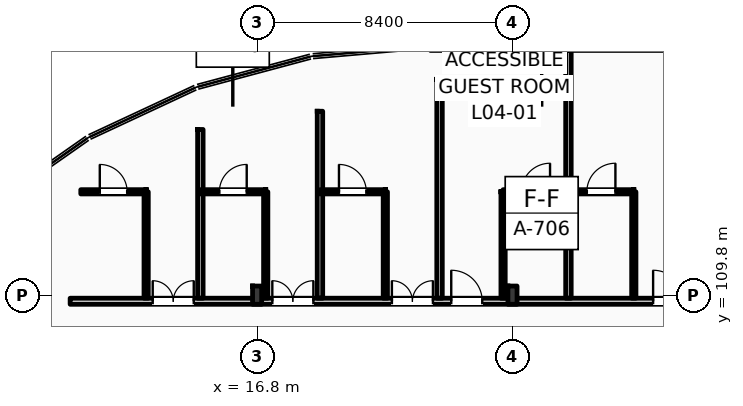
"""IFC4 building model, lengths in metres.
Left out: names, types, materials, properties, quantities, classifications, styles, units other than length and angle.
Written with IfcOpenShell. Run it as: python <this file> out.ifc"""

import sys

from ifc_helpers import new_model, si_unit, direction, frame, frame_2d, origin, origin_2d, place, context, subcontext, project, spatial, rectangle, i_section, extrude, element, fill, save


model = new_model("IFC4")
c1 = context("Model", 3, precision=1e-05, world=origin(), true_north=direction((0.0, 1.0)))
c2 = subcontext(c1, "Body", "Model", "MODEL_VIEW")
j1 = project(units=[si_unit("LENGTHUNIT", "METRE"), si_unit("PLANEANGLEUNIT", "RADIAN")], contexts=[c1])
p1 = place(None, origin())
s1 = spatial("IfcSite", under=j1, at=p1, CompositionType="ELEMENT")
p2 = place(p1, origin())
s2 = spatial("IfcBuilding", under=s1, at=p2, CompositionType="ELEMENT")
p3 = place(p2, frame((0.0, 0.0, 20.4)))
s3 = spatial("IfcBuildingStorey", under=s2, at=p3, CompositionType="ELEMENT", Elevation=20.4)
for number, where, z_axis, x_axis in (
    (1, (16.8, 109.8, 0.0), (0.0, 0.0, 1.0), (1.0, 0.0, 0.0)),
    (2, (25.2, 109.8, 0.0), (0.0, 0.0, 1.0), (1.0, 0.0, 0.0)),
):
    element("IfcColumn", number, at=place(p3, frame(where, z_axis=z_axis, x_axis=x_axis)), inside=s3, PredefinedType="COLUMN", context=c2, shape_type="SweptSolid", body=[
        extrude(i_section(OverallWidth=0.3, OverallDepth=0.6, WebThickness=0.015, FlangeThickness=0.03, FilletRadius=0.027, at=origin_2d()), origin(), (0.0, 0.0, 1.0), 4.2),
    ])
p4 = place(p3, frame((25.2, 118.0, 0.0), z_axis=(0.0, 0.0, 1.0), x_axis=(1.0, 0.0, 0.0)))
e3 = element("IfcColumn", 3, at=p4, inside=s3, PredefinedType="COLUMN", context=c2, shape_type="SweptSolid", body=[
    extrude(i_section(OverallWidth=0.3, OverallDepth=0.55, WebThickness=0.015, FlangeThickness=0.029, FilletRadius=0.027, at=origin_2d()), origin(), (0.0, 0.0, 1.0), 4.2),
])
p5 = place(p3, frame((10.65, 109.6, 0.0), z_axis=(0.0, 0.0, 1.0), x_axis=(1.0, 0.0, 0.0)))
e4 = element("IfcWall", 4, at=p5, inside=s3, PredefinedType="PARTITIONING", context=c2, shape_type="SweptSolid", body=[
    extrude(rectangle(XDim=109.21, YDim=0.2, at=frame_2d((54.605, 0.0))), origin(), (0.0, 0.0, 1.0), 3.38),
])
p6 = place(p5, frame((12.535, 0.0, 0.0)))
e5 = element("IfcOpeningElement", 5, at=p6, cuts=e4, PredefinedType="OPENING", context=c2, shape_type="SweptSolid", body=[
    extrude(rectangle(XDim=1.02, YDim=2.2, at=frame_2d((0.51, 1.1))), frame((0.0, 0.11, 0.0), z_axis=(0.0, -1.0, 0.0), x_axis=(1.0, 0.0, 0.0)), (0.0, 0.0, 1.0), 0.22),
])
p7 = place(p5, frame((19.175, 0.0, 0.0)))
e6 = element("IfcOpeningElement", 6, at=p7, cuts=e4, PredefinedType="OPENING", context=c2, shape_type="SweptSolid", body=[
    extrude(rectangle(XDim=1.02, YDim=2.2, at=frame_2d((0.51, 1.1))), frame((0.0, 0.11, 0.0), z_axis=(0.0, -1.0, 0.0), x_axis=(1.0, 0.0, 0.0)), (0.0, 0.0, 1.0), 0.22),
])
p8 = place(p5, frame((23.375, 0.0, 0.0)))
e7 = element("IfcOpeningElement", 7, at=p8, cuts=e4, PredefinedType="OPENING", context=c2, shape_type="SweptSolid", body=[
    extrude(rectangle(XDim=1.02, YDim=2.2, at=frame_2d((0.51, 1.1))), frame((0.0, 0.11, 0.0), z_axis=(0.0, -1.0, 0.0), x_axis=(1.0, 0.0, 0.0)), (0.0, 0.0, 1.0), 0.22),
])
p9 = place(p5, frame((27.575, 0.0, 0.0)))
e8 = element("IfcOpeningElement", 8, at=p9, cuts=e4, PredefinedType="OPENING", context=c2, shape_type="SweptSolid", body=[
    extrude(rectangle(XDim=1.02, YDim=2.2, at=frame_2d((0.51, 1.1))), frame((0.0, 0.11, 0.0), z_axis=(0.0, -1.0, 0.0), x_axis=(1.0, 0.0, 0.0)), (0.0, 0.0, 1.0), 0.22),
])
p10 = place(p5, frame((31.805, 0.0, 0.0)))
e9 = element("IfcOpeningElement", 9, at=p10, cuts=e4, PredefinedType="OPENING", context=c2, shape_type="SweptSolid", body=[
    extrude(rectangle(XDim=0.96, YDim=2.2, at=frame_2d((0.48, 1.1))), frame((0.0, 0.11, 0.0), z_axis=(0.0, -1.0, 0.0), x_axis=(1.0, 0.0, 0.0)), (0.0, 0.0, 1.0), 0.22),
])
p11 = place(p5, frame((33.855, 0.0, 0.0)))
e10 = element("IfcOpeningElement", 10, at=p11, cuts=e4, PredefinedType="OPENING", context=c2, shape_type="SweptSolid", body=[
    extrude(rectangle(XDim=0.96, YDim=2.2, at=frame_2d((0.48, 1.1))), frame((0.0, 0.11, 0.0), z_axis=(0.0, -1.0, 0.0), x_axis=(1.0, 0.0, 0.0)), (0.0, 0.0, 1.0), 0.22),
])
p12 = place(p5, frame((40.205, 0.0, 0.0)))
e11 = element("IfcOpeningElement", 11, at=p12, cuts=e4, PredefinedType="OPENING", context=c2, shape_type="SweptSolid", body=[
    extrude(rectangle(XDim=0.96, YDim=2.2, at=frame_2d((0.48, 1.1))), frame((0.0, 0.11, 0.0), z_axis=(0.0, -1.0, 0.0), x_axis=(1.0, 0.0, 0.0)), (0.0, 0.0, 1.0), 0.22),
])
p13 = place(p5, frame((42.255, 0.0, 0.0)))
e12 = element("IfcOpeningElement", 12, at=p13, cuts=e4, PredefinedType="OPENING", context=c2, shape_type="SweptSolid", body=[
    extrude(rectangle(XDim=0.96, YDim=2.2, at=frame_2d((0.48, 1.1))), frame((0.0, 0.11, 0.0), z_axis=(0.0, -1.0, 0.0), x_axis=(1.0, 0.0, 0.0)), (0.0, 0.0, 1.0), 0.22),
])
p14 = place(p5, frame((48.605, 0.0, 0.0)))
e13 = element("IfcOpeningElement", 13, at=p14, cuts=e4, PredefinedType="OPENING", context=c2, shape_type="SweptSolid", body=[
    extrude(rectangle(XDim=0.96, YDim=2.2, at=frame_2d((0.48, 1.1))), frame((0.0, 0.11, 0.0), z_axis=(0.0, -1.0, 0.0), x_axis=(1.0, 0.0, 0.0)), (0.0, 0.0, 1.0), 0.22),
])
p15 = place(p5, frame((50.655, 0.0, 0.0)))
e14 = element("IfcOpeningElement", 14, at=p15, cuts=e4, PredefinedType="OPENING", context=c2, shape_type="SweptSolid", body=[
    extrude(rectangle(XDim=0.96, YDim=2.2, at=frame_2d((0.48, 1.1))), frame((0.0, 0.11, 0.0), z_axis=(0.0, -1.0, 0.0), x_axis=(1.0, 0.0, 0.0)), (0.0, 0.0, 1.0), 0.22),
])
p16 = place(p5, frame((57.005, 0.0, 0.0)))
e15 = element("IfcOpeningElement", 15, at=p16, cuts=e4, PredefinedType="OPENING", context=c2, shape_type="SweptSolid", body=[
    extrude(rectangle(XDim=0.96, YDim=2.2, at=frame_2d((0.48, 1.1))), frame((0.0, 0.11, 0.0), z_axis=(0.0, -1.0, 0.0), x_axis=(1.0, 0.0, 0.0)), (0.0, 0.0, 1.0), 0.22),
])
p17 = place(p5, frame((59.055, 0.0, 0.0)))
e16 = element("IfcOpeningElement", 16, at=p17, cuts=e4, PredefinedType="OPENING", context=c2, shape_type="SweptSolid", body=[
    extrude(rectangle(XDim=0.96, YDim=2.2, at=frame_2d((0.48, 1.1))), frame((0.0, 0.11, 0.0), z_axis=(0.0, -1.0, 0.0), x_axis=(1.0, 0.0, 0.0)), (0.0, 0.0, 1.0), 0.22),
])
p18 = place(p5, frame((65.405, 0.0, 0.0)))
e17 = element("IfcOpeningElement", 17, at=p18, cuts=e4, PredefinedType="OPENING", context=c2, shape_type="SweptSolid", body=[
    extrude(rectangle(XDim=0.96, YDim=2.2, at=frame_2d((0.48, 1.1))), frame((0.0, 0.11, 0.0), z_axis=(0.0, -1.0, 0.0), x_axis=(1.0, 0.0, 0.0)), (0.0, 0.0, 1.0), 0.22),
])
p19 = place(p5, frame((67.205, 0.0, 0.0)))
e18 = element("IfcOpeningElement", 18, at=p19, cuts=e4, PredefinedType="OPENING", context=c2, shape_type="SweptSolid", body=[
    extrude(rectangle(XDim=0.96, YDim=2.2, at=frame_2d((0.48, 1.1))), frame((0.0, 0.11, 0.0), z_axis=(0.0, -1.0, 0.0), x_axis=(1.0, 0.0, 0.0)), (0.0, 0.0, 1.0), 0.22),
])
p20 = place(p5, frame((73.805, 0.0, 0.0)))
e19 = element("IfcOpeningElement", 19, at=p20, cuts=e4, PredefinedType="OPENING", context=c2, shape_type="SweptSolid", body=[
    extrude(rectangle(XDim=0.96, YDim=2.2, at=frame_2d((0.48, 1.1))), frame((0.0, 0.11, 0.0), z_axis=(0.0, -1.0, 0.0), x_axis=(1.0, 0.0, 0.0)), (0.0, 0.0, 1.0), 0.22),
])
p21 = place(p5, frame((78.255, 0.0, 0.0)))
e20 = element("IfcOpeningElement", 20, at=p21, cuts=e4, PredefinedType="OPENING", context=c2, shape_type="SweptSolid", body=[
    extrude(rectangle(XDim=0.96, YDim=2.2, at=frame_2d((0.48, 1.1))), frame((0.0, 0.11, 0.0), z_axis=(0.0, -1.0, 0.0), x_axis=(1.0, 0.0, 0.0)), (0.0, 0.0, 1.0), 0.22),
])
p22 = place(p5, frame((82.205, 0.0, 0.0)))
e21 = element("IfcOpeningElement", 21, at=p22, cuts=e4, PredefinedType="OPENING", context=c2, shape_type="SweptSolid", body=[
    extrude(rectangle(XDim=0.96, YDim=2.2, at=frame_2d((0.48, 1.1))), frame((0.0, 0.11, 0.0), z_axis=(0.0, -1.0, 0.0), x_axis=(1.0, 0.0, 0.0)), (0.0, 0.0, 1.0), 0.22),
])
p23 = place(p5, frame((86.405, 0.0, 0.0)))
e22 = element("IfcOpeningElement", 22, at=p23, cuts=e4, PredefinedType="OPENING", context=c2, shape_type="SweptSolid", body=[
    extrude(rectangle(XDim=0.96, YDim=2.2, at=frame_2d((0.48, 1.1))), frame((0.0, 0.11, 0.0), z_axis=(0.0, -1.0, 0.0), x_axis=(1.0, 0.0, 0.0)), (0.0, 0.0, 1.0), 0.22),
])
p24 = place(p5, frame((90.605, 0.0, 0.0)))
e23 = element("IfcOpeningElement", 23, at=p24, cuts=e4, PredefinedType="OPENING", context=c2, shape_type="SweptSolid", body=[
    extrude(rectangle(XDim=0.96, YDim=2.2, at=frame_2d((0.48, 1.1))), frame((0.0, 0.11, 0.0), z_axis=(0.0, -1.0, 0.0), x_axis=(1.0, 0.0, 0.0)), (0.0, 0.0, 1.0), 0.22),
])
p25 = place(p5, frame((94.805, 0.0, 0.0)))
e24 = element("IfcOpeningElement", 24, at=p25, cuts=e4, PredefinedType="OPENING", context=c2, shape_type="SweptSolid", body=[
    extrude(rectangle(XDim=0.96, YDim=2.2, at=frame_2d((0.48, 1.1))), frame((0.0, 0.11, 0.0), z_axis=(0.0, -1.0, 0.0), x_axis=(1.0, 0.0, 0.0)), (0.0, 0.0, 1.0), 0.22),
])
p26 = place(p5, frame((99.005, 0.0, 0.0)))
e25 = element("IfcOpeningElement", 25, at=p26, cuts=e4, PredefinedType="OPENING", context=c2, shape_type="SweptSolid", body=[
    extrude(rectangle(XDim=0.96, YDim=2.2, at=frame_2d((0.48, 1.1))), frame((0.0, 0.11, 0.0), z_axis=(0.0, -1.0, 0.0), x_axis=(1.0, 0.0, 0.0)), (0.0, 0.0, 1.0), 0.22),
])
p27 = place(p5, frame((103.205, 0.0, 0.0)))
e26 = element("IfcOpeningElement", 26, at=p27, cuts=e4, PredefinedType="OPENING", context=c2, shape_type="SweptSolid", body=[
    extrude(rectangle(XDim=0.96, YDim=2.2, at=frame_2d((0.48, 1.1))), frame((0.0, 0.11, 0.0), z_axis=(0.0, -1.0, 0.0), x_axis=(1.0, 0.0, 0.0)), (0.0, 0.0, 1.0), 0.22),
])
p28 = place(p5, frame((105.335, 0.0, 0.0)))
e27 = element("IfcOpeningElement", 27, at=p28, cuts=e4, PredefinedType="OPENING", context=c2, shape_type="SweptSolid", body=[
    extrude(rectangle(XDim=0.96, YDim=2.2, at=frame_2d((0.48, 1.1))), frame((0.0, 0.11, 0.0), z_axis=(0.0, -1.0, 0.0), x_axis=(1.0, 0.0, 0.0)), (0.0, 0.0, 1.0), 0.22),
])
p29 = place(p5, frame((2.716, 0.0, 0.0)))
e28 = element("IfcOpeningElement", 28, at=p29, cuts=e4, PredefinedType="OPENING", context=c2, shape_type="SweptSolid", body=[
    extrude(rectangle(XDim=1.35, YDim=2.25, at=frame_2d((0.675, 1.125))), frame((0.0, 0.11, 0.0), z_axis=(0.0, -1.0, 0.0), x_axis=(1.0, 0.0, 0.0)), (0.0, 0.0, 1.0), 0.22),
])
p30 = place(p5, frame((6.65, 0.0, 0.0)))
e29 = element("IfcOpeningElement", 29, at=p30, cuts=e4, PredefinedType="OPENING", context=c2, shape_type="SweptSolid", body=[
    extrude(rectangle(XDim=1.35, YDim=2.25, at=frame_2d((0.675, 1.125))), frame((0.0, 0.11, 0.0), z_axis=(0.0, -1.0, 0.0), x_axis=(1.0, 0.0, 0.0)), (0.0, 0.0, 1.0), 0.22),
])
p31 = place(p5, frame((10.583, 0.0, 0.0)))
e30 = element("IfcOpeningElement", 30, at=p31, cuts=e4, PredefinedType="OPENING", context=c2, shape_type="SweptSolid", body=[
    extrude(rectangle(XDim=1.35, YDim=2.25, at=frame_2d((0.675, 1.125))), frame((0.0, 0.11, 0.0), z_axis=(0.0, -1.0, 0.0), x_axis=(1.0, 0.0, 0.0)), (0.0, 0.0, 1.0), 0.22),
])
p32 = place(p3, frame((27.04, 109.7, 0.0), z_axis=(0.0, 0.0, 1.0), x_axis=(0.0, 1.0, 0.0)))
e31 = element("IfcWall", 31, at=p32, inside=s3, PredefinedType="PARTITIONING", context=c2, shape_type="SweptSolid", body=[
    extrude(rectangle(XDim=8.15, YDim=0.18, at=frame_2d((4.075, 0.0))), origin(), (0.0, 0.0, 1.0), 3.94),
])
p33 = place(p3, frame((24.89, 109.7, 0.0), z_axis=(0.0, 0.0, 1.0), x_axis=(0.0, 1.0, 0.0)))
e32 = element("IfcWall", 32, at=p33, inside=s3, PredefinedType="PARTITIONING", context=c2, shape_type="SweptSolid", body=[
    extrude(rectangle(XDim=3.5, YDim=0.14, at=frame_2d((1.75, 0.0))), origin(), (0.0, 0.0, 1.0), 3.94),
])
p34 = place(p3, frame((24.89, 113.2, 0.0), z_axis=(0.0, 0.0, 1.0), x_axis=(1.0, 0.0, 0.0)))
e33 = element("IfcWall", 33, at=p34, inside=s3, PredefinedType="PARTITIONING", context=c2, shape_type="SweptSolid", body=[
    extrude(rectangle(XDim=2.15, YDim=0.14, at=frame_2d((1.075, 0.0))), origin(), (0.0, 0.0, 1.0), 3.94),
])
p35 = place(p34, frame((0.605, 0.0, 0.0)))
e34 = element("IfcOpeningElement", 34, at=p35, cuts=e33, PredefinedType="OPENING", context=c2, shape_type="SweptSolid", body=[
    extrude(rectangle(XDim=0.94, YDim=2.15, at=frame_2d((0.47, 1.075))), frame((0.0, 0.08, 0.0), z_axis=(0.0, -1.0, 0.0), x_axis=(1.0, 0.0, 0.0)), (0.0, 0.0, 1.0), 0.16),
])
p36 = place(p3, frame((29.19, 109.7, 0.0), z_axis=(0.0, 0.0, 1.0), x_axis=(0.0, 1.0, 0.0)))
e35 = element("IfcWall", 35, at=p36, inside=s3, PredefinedType="PARTITIONING", context=c2, shape_type="SweptSolid", body=[
    extrude(rectangle(XDim=3.5, YDim=0.14, at=frame_2d((1.75, 0.0))), origin(), (0.0, 0.0, 1.0), 3.94),
])
p37 = place(p3, frame((27.04, 113.2, 0.0), z_axis=(0.0, 0.0, 1.0), x_axis=(1.0, 0.0, 0.0)))
e36 = element("IfcWall", 36, at=p37, inside=s3, PredefinedType="PARTITIONING", context=c2, shape_type="SweptSolid", body=[
    extrude(rectangle(XDim=2.15, YDim=0.14, at=frame_2d((1.075, 0.0))), origin(), (0.0, 0.0, 1.0), 3.94),
])
p38 = place(p37, frame((0.605, 0.0, 0.0)))
e37 = element("IfcOpeningElement", 37, at=p38, cuts=e36, PredefinedType="OPENING", context=c2, shape_type="SweptSolid", body=[
    extrude(rectangle(XDim=0.94, YDim=2.15, at=frame_2d((0.47, 1.075))), frame((0.0, 0.08, 0.0), z_axis=(0.0, -1.0, 0.0), x_axis=(1.0, 0.0, 0.0)), (0.0, 0.0, 1.0), 0.16),
])
p39 = place(p3, frame((14.933, 109.7, 0.0), z_axis=(0.0, 0.0, 1.0), x_axis=(0.0, 1.0, 0.0)))
e38 = element("IfcWall", 38, at=p39, inside=s3, PredefinedType="PARTITIONING", context=c2, shape_type="SweptSolid", body=[
    extrude(rectangle(XDim=5.55, YDim=0.18, at=frame_2d((2.775, 0.0))), origin(), (0.0, 0.0, 1.0), 3.94),
])
p40 = place(p3, frame((13.15, 109.7, 0.0), z_axis=(0.0, 0.0, 1.0), x_axis=(0.0, 1.0, 0.0)))
e39 = element("IfcWall", 39, at=p40, inside=s3, PredefinedType="PARTITIONING", context=c2, shape_type="SweptSolid", body=[
    extrude(rectangle(XDim=3.5, YDim=0.14, at=frame_2d((1.75, 0.0))), origin(), (0.0, 0.0, 1.0), 3.94),
])
p41 = place(p3, frame((11.0, 113.2, 0.0), z_axis=(0.0, 0.0, 1.0), x_axis=(1.0, 0.0, 0.0)))
e40 = element("IfcWall", 40, at=p41, inside=s3, PredefinedType="PARTITIONING", context=c2, shape_type="SweptSolid", body=[
    extrude(rectangle(XDim=2.15, YDim=0.14, at=frame_2d((1.075, 0.0))), origin(), (0.0, 0.0, 1.0), 3.94),
])
p42 = place(p41, frame((0.625, 0.0, 0.0)))
e41 = element("IfcOpeningElement", 41, at=p42, cuts=e40, PredefinedType="OPENING", context=c2, shape_type="SweptSolid", body=[
    extrude(rectangle(XDim=0.9, YDim=2.1, at=frame_2d((0.45, 1.05))), frame((0.0, 0.08, 0.0), z_axis=(0.0, -1.0, 0.0), x_axis=(1.0, 0.0, 0.0)), (0.0, 0.0, 1.0), 0.16),
])
p43 = place(p3, frame((18.867, 109.7, 0.0), z_axis=(0.0, 0.0, 1.0), x_axis=(0.0, 1.0, 0.0)))
e42 = element("IfcWall", 42, at=p43, inside=s3, PredefinedType="PARTITIONING", context=c2, shape_type="SweptSolid", body=[
    extrude(rectangle(XDim=6.15, YDim=0.18, at=frame_2d((3.075, 0.0))), origin(), (0.0, 0.0, 1.0), 3.94),
])
p44 = place(p3, frame((17.083, 109.7, 0.0), z_axis=(0.0, 0.0, 1.0), x_axis=(0.0, 1.0, 0.0)))
e43 = element("IfcWall", 43, at=p44, inside=s3, PredefinedType="PARTITIONING", context=c2, shape_type="SweptSolid", body=[
    extrude(rectangle(XDim=3.5, YDim=0.14, at=frame_2d((1.75, 0.0))), origin(), (0.0, 0.0, 1.0), 3.94),
])
p45 = place(p3, frame((14.933, 113.2, 0.0), z_axis=(0.0, 0.0, 1.0), x_axis=(1.0, 0.0, 0.0)))
e44 = element("IfcWall", 44, at=p45, inside=s3, PredefinedType="PARTITIONING", context=c2, shape_type="SweptSolid", body=[
    extrude(rectangle(XDim=2.15, YDim=0.14, at=frame_2d((1.075, 0.0))), origin(), (0.0, 0.0, 1.0), 3.94),
])
p46 = place(p45, frame((0.625, 0.0, 0.0)))
e45 = element("IfcOpeningElement", 45, at=p46, cuts=e44, PredefinedType="OPENING", context=c2, shape_type="SweptSolid", body=[
    extrude(rectangle(XDim=0.9, YDim=2.1, at=frame_2d((0.45, 1.05))), frame((0.0, 0.08, 0.0), z_axis=(0.0, -1.0, 0.0), x_axis=(1.0, 0.0, 0.0)), (0.0, 0.0, 1.0), 0.16),
])
p47 = place(p3, frame((22.8, 109.7, 0.0), z_axis=(0.0, 0.0, 1.0), x_axis=(0.0, 1.0, 0.0)))
e46 = element("IfcWall", 46, at=p47, inside=s3, PredefinedType="PARTITIONING", context=c2, shape_type="SweptSolid", body=[
    extrude(rectangle(XDim=7.2, YDim=0.18, at=frame_2d((3.6, 0.0))), origin(), (0.0, 0.0, 1.0), 3.94),
])
p48 = place(p3, frame((21.017, 109.7, 0.0), z_axis=(0.0, 0.0, 1.0), x_axis=(0.0, 1.0, 0.0)))
e47 = element("IfcWall", 47, at=p48, inside=s3, PredefinedType="PARTITIONING", context=c2, shape_type="SweptSolid", body=[
    extrude(rectangle(XDim=3.5, YDim=0.14, at=frame_2d((1.75, 0.0))), origin(), (0.0, 0.0, 1.0), 3.94),
])
p49 = place(p3, frame((18.867, 113.2, 0.0), z_axis=(0.0, 0.0, 1.0), x_axis=(1.0, 0.0, 0.0)))
e48 = element("IfcWall", 48, at=p49, inside=s3, PredefinedType="PARTITIONING", context=c2, shape_type="SweptSolid", body=[
    extrude(rectangle(XDim=2.15, YDim=0.14, at=frame_2d((1.075, 0.0))), origin(), (0.0, 0.0, 1.0), 3.94),
])
p50 = place(p49, frame((0.625, 0.0, 0.0)))
e49 = element("IfcOpeningElement", 49, at=p50, cuts=e48, PredefinedType="OPENING", context=c2, shape_type="SweptSolid", body=[
    extrude(rectangle(XDim=0.9, YDim=2.1, at=frame_2d((0.45, 1.05))), frame((0.0, 0.08, 0.0), z_axis=(0.0, -1.0, 0.0), x_axis=(1.0, 0.0, 0.0)), (0.0, 0.0, 1.0), 0.16),
])
p51 = place(p6, origin())
e50 = element("IfcDoor", 50, at=p51, inside=s3, OperationType="SINGLE_SWING_LEFT", PredefinedType="DOOR", context=c2, shape_type="SweptSolid", body=[
    extrude(rectangle(XDim=1.02, YDim=2.2, at=frame_2d((0.51, 1.1))), frame((0.0, 0.025, 0.0), z_axis=(0.0, -1.0, 0.0), x_axis=(1.0, 0.0, 0.0)), (0.0, 0.0, 1.0), 0.05),
])
fill(e5, e50)
p52 = place(p35, origin())
e51 = element("IfcDoor", 51, at=p52, inside=s3, OperationType="SINGLE_SWING_RIGHT", PredefinedType="DOOR", context=c2, shape_type="SweptSolid", body=[
    extrude(rectangle(XDim=0.94, YDim=2.15, at=frame_2d((0.47, 1.075))), frame((0.0, 0.025, 0.0), z_axis=(0.0, -1.0, 0.0), x_axis=(1.0, 0.0, 0.0)), (0.0, 0.0, 1.0), 0.05),
])
fill(e34, e51)
p53 = place(p7, origin())
e52 = element("IfcDoor", 52, at=p53, inside=s3, OperationType="SINGLE_SWING_LEFT", PredefinedType="DOOR", context=c2, shape_type="SweptSolid", body=[
    extrude(rectangle(XDim=1.02, YDim=2.2, at=frame_2d((0.51, 1.1))), frame((0.0, 0.025, 0.0), z_axis=(0.0, -1.0, 0.0), x_axis=(1.0, 0.0, 0.0)), (0.0, 0.0, 1.0), 0.05),
])
fill(e6, e52)
p54 = place(p38, origin())
e53 = element("IfcDoor", 53, at=p54, inside=s3, OperationType="SINGLE_SWING_RIGHT", PredefinedType="DOOR", context=c2, shape_type="SweptSolid", body=[
    extrude(rectangle(XDim=0.94, YDim=2.15, at=frame_2d((0.47, 1.075))), frame((0.0, 0.025, 0.0), z_axis=(0.0, -1.0, 0.0), x_axis=(1.0, 0.0, 0.0)), (0.0, 0.0, 1.0), 0.05),
])
fill(e37, e53)
p55 = place(p29, origin())
e54 = element("IfcDoor", 54, at=p55, inside=s3, OperationType="DOUBLE_SWING_LEFT", PredefinedType="DOOR", context=c2, shape_type="SweptSolid", body=[
    extrude(rectangle(XDim=1.35, YDim=2.25, at=frame_2d((0.675, 1.125))), frame((0.0, 0.025, 0.0), z_axis=(0.0, -1.0, 0.0), x_axis=(1.0, 0.0, 0.0)), (0.0, 0.0, 1.0), 0.05),
])
fill(e28, e54)
p56 = place(p42, origin())
e55 = element("IfcDoor", 55, at=p56, inside=s3, OperationType="SINGLE_SWING_LEFT", PredefinedType="DOOR", context=c2, shape_type="SweptSolid", body=[
    extrude(rectangle(XDim=0.9, YDim=2.1, at=frame_2d((0.45, 1.05))), frame((0.0, 0.025, 0.0), z_axis=(0.0, -1.0, 0.0), x_axis=(1.0, 0.0, 0.0)), (0.0, 0.0, 1.0), 0.05),
])
fill(e41, e55)
p57 = place(p30, origin())
e56 = element("IfcDoor", 56, at=p57, inside=s3, OperationType="DOUBLE_SWING_LEFT", PredefinedType="DOOR", context=c2, shape_type="SweptSolid", body=[
    extrude(rectangle(XDim=1.35, YDim=2.25, at=frame_2d((0.675, 1.125))), frame((0.0, 0.025, 0.0), z_axis=(0.0, -1.0, 0.0), x_axis=(1.0, 0.0, 0.0)), (0.0, 0.0, 1.0), 0.05),
])
fill(e29, e56)
p58 = place(p46, origin())
e57 = element("IfcDoor", 57, at=p58, inside=s3, OperationType="SINGLE_SWING_RIGHT", PredefinedType="DOOR", context=c2, shape_type="SweptSolid", body=[
    extrude(rectangle(XDim=0.9, YDim=2.1, at=frame_2d((0.45, 1.05))), frame((0.0, 0.025, 0.0), z_axis=(0.0, -1.0, 0.0), x_axis=(1.0, 0.0, 0.0)), (0.0, 0.0, 1.0), 0.05),
])
fill(e45, e57)
p59 = place(p31, origin())
e58 = element("IfcDoor", 58, at=p59, inside=s3, OperationType="DOUBLE_SWING_LEFT", PredefinedType="DOOR", context=c2, shape_type="SweptSolid", body=[
    extrude(rectangle(XDim=1.35, YDim=2.25, at=frame_2d((0.675, 1.125))), frame((0.0, 0.025, 0.0), z_axis=(0.0, -1.0, 0.0), x_axis=(1.0, 0.0, 0.0)), (0.0, 0.0, 1.0), 0.05),
])
fill(e30, e58)
p60 = place(p50, origin())
e59 = element("IfcDoor", 59, at=p60, inside=s3, OperationType="SINGLE_SWING_LEFT", PredefinedType="DOOR", context=c2, shape_type="SweptSolid", body=[
    extrude(rectangle(XDim=0.9, YDim=2.1, at=frame_2d((0.45, 1.05))), frame((0.0, 0.025, 0.0), z_axis=(0.0, -1.0, 0.0), x_axis=(1.0, 0.0, 0.0)), (0.0, 0.0, 1.0), 0.05),
])
fill(e49, e59)
save(model, sys.argv[1])
